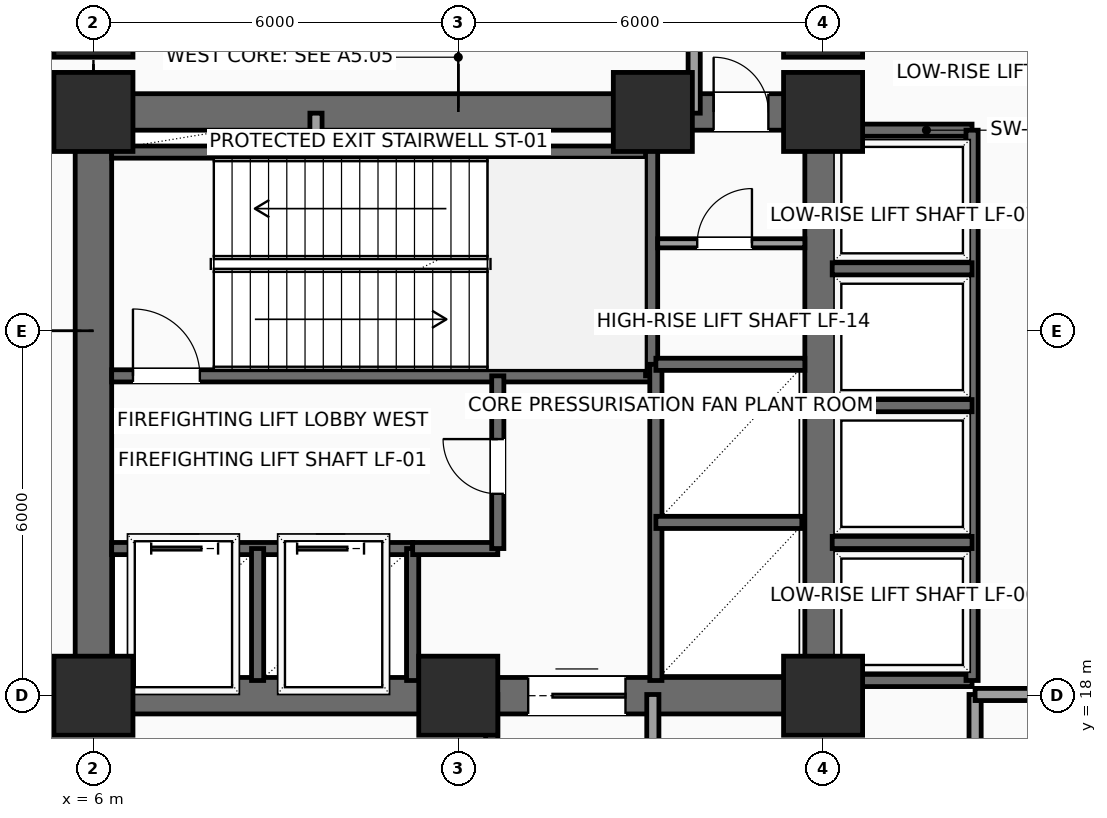
"""IFC4 building model, lengths in metres.
Left out: names, types, materials, properties, quantities, classifications, styles, units other than length and angle.
Written with IfcOpenShell. Run it as: python <this file> out.ifc"""

import sys

from ifc_helpers import new_model, si_unit, direction, frame, frame_2d, origin, origin_2d, place, context, subcontext, project, spatial, rectangle, extrude, element, fill, save


model = new_model("IFC4")
c1 = context("Model", 3, precision=1e-05, world=origin(), true_north=direction((0.0, 1.0)))
c2 = subcontext(c1, "Body", "Model", "MODEL_VIEW")
j1 = project(units=[si_unit("LENGTHUNIT", "METRE"), si_unit("PLANEANGLEUNIT", "RADIAN")], contexts=[c1])
p1 = place(None, origin())
s1 = spatial("IfcSite", under=j1, at=p1, CompositionType="ELEMENT")
p2 = place(p1, origin())
s2 = spatial("IfcBuilding", under=s1, at=p2, CompositionType="ELEMENT")
p3 = place(p2, frame((0.0, 0.0, 94.8)))
s3 = spatial("IfcBuildingStorey", under=s2, at=p3, CompositionType="ELEMENT", Elevation=94.8)
for number, where, z_axis, x_axis in (
    (1, (6.0, 18.0, 0.0), (0.0, 0.0, 1.0), (1.0, 0.0, 0.0)),
    (2, (12.0, 18.0, 0.0), (0.0, 0.0, 1.0), (1.0, 0.0, 0.0)),
    (3, (18.0, 18.0, 0.0), (0.0, 0.0, 1.0), (1.0, 0.0, 0.0)),
    (4, (6.0, 27.6, 0.0), (0.0, 0.0, 1.0), (1.0, 0.0, 0.0)),
    (5, (15.2, 27.6, 0.0), (0.0, 0.0, 1.0), (1.0, 0.0, 0.0)),
    (6, (18.0, 27.6, 0.0), (0.0, 0.0, 1.0), (1.0, 0.0, 0.0)),
    (7, (6.0, 29.15, 0.0), (0.0, 0.0, 1.0), (1.0, 0.0, 0.0)),
    (8, (18.0, 29.15, 0.0), (0.0, 0.0, 1.0), (1.0, 0.0, 0.0)),
):
    element("IfcColumn", number, at=place(p3, frame(where, z_axis=z_axis, x_axis=x_axis)), inside=s3, PredefinedType="COLUMN", context=c2, shape_type="SweptSolid", body=[
        extrude(rectangle(XDim=1.3, YDim=1.3, at=origin_2d()), origin(), (0.0, 0.0, 1.0), 4.8),
    ])
p4 = place(p3, frame((6.0, 18.0, 0.0), z_axis=(0.0, 0.0, 1.0), x_axis=(1.0, 0.0, 0.0)))
e9 = element("IfcWall", 9, at=p4, inside=s3, PredefinedType="SHEAR", context=c2, shape_type="SweptSolid", body=[
    extrude(rectangle(XDim=12.0, YDim=0.6, at=frame_2d((6.0, 0.0))), origin(), (0.0, 0.0, 1.0), 4.575),
])
p5 = place(p4, frame((7.15, 0.0, 0.0)))
e10 = element("IfcOpeningElement", 10, at=p5, cuts=e9, PredefinedType="OPENING", context=c2, shape_type="SweptSolid", body=[
    extrude(rectangle(XDim=1.6, YDim=2.3, at=frame_2d((0.8, 1.15))), frame((0.0, 0.31, 0.0), z_axis=(0.0, -1.0, 0.0), x_axis=(1.0, 0.0, 0.0)), (0.0, 0.0, 1.0), 0.62),
])
p6 = place(p3, frame((6.0, 27.6, 0.0), z_axis=(0.0, 0.0, 1.0), x_axis=(1.0, 0.0, 0.0)))
e11 = element("IfcWall", 11, at=p6, inside=s3, PredefinedType="SHEAR", context=c2, shape_type="SweptSolid", body=[
    extrude(rectangle(XDim=12.0, YDim=0.6, at=frame_2d((6.0, 0.0))), origin(), (0.0, 0.0, 1.0), 4.575),
])
p7 = place(p6, frame((10.2, 0.0, 0.0)))
e12 = element("IfcOpeningElement", 12, at=p7, cuts=e11, PredefinedType="OPENING", context=c2, shape_type="SweptSolid", body=[
    extrude(rectangle(XDim=0.9, YDim=2.15, at=frame_2d((0.45, 1.075))), frame((0.0, 0.31, 0.0), z_axis=(0.0, -1.0, 0.0), x_axis=(1.0, 0.0, 0.0)), (0.0, 0.0, 1.0), 0.62),
])
for number, where, z_axis, x_axis in (
    (13, (6.0, 18.0, 0.0), (0.0, 0.0, 1.0), (0.0, 1.0, 0.0)),
    (14, (18.0, 18.0, 0.0), (0.0, 0.0, 1.0), (0.0, 1.0, 0.0)),
):
    element("IfcWall", number, at=place(p3, frame(where, z_axis=z_axis, x_axis=x_axis)), inside=s3, PredefinedType="SHEAR", context=c2, shape_type="SweptSolid", body=[
        extrude(rectangle(XDim=9.6, YDim=0.6, at=frame_2d((4.8, 0.0))), origin(), (0.0, 0.0, 1.0), 4.575),
    ])
p8 = place(p3, frame((6.3, 23.26, 0.0), z_axis=(0.0, 0.0, 1.0), x_axis=(1.0, 0.0, 0.0)))
e15 = element("IfcWall", 15, at=p8, inside=s3, PredefinedType="SHEAR", context=c2, shape_type="SweptSolid", body=[
    extrude(rectangle(XDim=8.88, YDim=0.2, at=frame_2d((4.44, 0.0))), origin(), (0.0, 0.0, 1.0), 4.575),
])
p9 = place(p8, frame((0.35, 0.0, 0.0)))
e16 = element("IfcOpeningElement", 16, at=p9, cuts=e15, PredefinedType="OPENING", context=c2, shape_type="SweptSolid", body=[
    extrude(rectangle(XDim=1.1, YDim=2.2, at=frame_2d((0.55, 1.1))), frame((0.0, 0.11, 0.0), z_axis=(0.0, -1.0, 0.0), x_axis=(1.0, 0.0, 0.0)), (0.0, 0.0, 1.0), 0.22),
])
p10 = place(p3, frame((6.3, 26.94, 0.0), z_axis=(0.0, 0.0, 1.0), x_axis=(1.0, 0.0, 0.0)))
e17 = element("IfcWall", 17, at=p10, inside=s3, PredefinedType="SHEAR", context=c2, shape_type="SweptSolid", body=[
    extrude(rectangle(XDim=8.88, YDim=0.2, at=frame_2d((4.44, 0.0))), origin(), (0.0, 0.0, 1.0), 4.575),
])
p11 = place(p3, frame((15.18, 23.26, 0.0), z_axis=(0.0, 0.0, 1.0), x_axis=(0.0, 1.0, 0.0)))
e18 = element("IfcWall", 18, at=p11, inside=s3, PredefinedType="SHEAR", context=c2, shape_type="SweptSolid", body=[
    extrude(rectangle(XDim=4.04, YDim=0.2, at=frame_2d((2.02, 0.0))), origin(), (0.0, 0.0, 1.0), 4.575),
])
p12 = place(p3, frame((6.3, 20.42, 0.0), z_axis=(0.0, 0.0, 1.0), x_axis=(1.0, 0.0, 0.0)))
e19 = element("IfcWall", 19, at=p12, inside=s3, PredefinedType="SHEAR", context=c2, shape_type="SweptSolid", body=[
    extrude(rectangle(XDim=4.95, YDim=0.2, at=frame_2d((2.475, 0.0))), origin(), (0.0, 0.0, 1.0), 4.575),
])
p13 = place(p12, frame((0.65, 0.0, 0.0)))
e20 = element("IfcOpeningElement", 20, at=p13, cuts=e19, PredefinedType="OPENING", context=c2, shape_type="SweptSolid", body=[
    extrude(rectangle(XDim=1.1, YDim=2.2, at=frame_2d((0.55, 1.1))), frame((0.0, 0.11, 0.0), z_axis=(0.0, -1.0, 0.0), x_axis=(1.0, 0.0, 0.0)), (0.0, 0.0, 1.0), 0.22),
])
p14 = place(p12, frame((3.05, 0.0, 0.0)))
e21 = element("IfcOpeningElement", 21, at=p14, cuts=e19, PredefinedType="OPENING", context=c2, shape_type="SweptSolid", body=[
    extrude(rectangle(XDim=1.1, YDim=2.2, at=frame_2d((0.55, 1.1))), frame((0.0, 0.11, 0.0), z_axis=(0.0, -1.0, 0.0), x_axis=(1.0, 0.0, 0.0)), (0.0, 0.0, 1.0), 0.22),
])
for number, where, z_axis, x_axis in (
    (22, (8.7, 18.25, 0.0), (0.0, 0.0, 1.0), (0.0, 1.0, 0.0)),
    (23, (11.25, 18.25, 0.0), (0.0, 0.0, 1.0), (0.0, 1.0, 0.0)),
):
    element("IfcWall", number, at=place(p3, frame(where, z_axis=z_axis, x_axis=x_axis)), inside=s3, PredefinedType="SHEAR", context=c2, shape_type="SweptSolid", body=[
        extrude(rectangle(XDim=2.17, YDim=0.2, at=frame_2d((1.085, 0.0))), origin(), (0.0, 0.0, 1.0), 4.575),
    ])
p15 = place(p3, frame((11.25, 20.42, 0.0), z_axis=(0.0, 0.0, 1.0), x_axis=(1.0, 0.0, 0.0)))
e24 = element("IfcWall", 24, at=p15, inside=s3, PredefinedType="SHEAR", context=c2, shape_type="SweptSolid", body=[
    extrude(rectangle(XDim=1.4, YDim=0.2, at=frame_2d((0.7, 0.0))), origin(), (0.0, 0.0, 1.0), 4.575),
])
p16 = place(p3, frame((12.65, 20.42, 0.0), z_axis=(0.0, 0.0, 1.0), x_axis=(0.0, 1.0, 0.0)))
e25 = element("IfcWall", 25, at=p16, inside=s3, PredefinedType="SHEAR", context=c2, shape_type="SweptSolid", body=[
    extrude(rectangle(XDim=2.84, YDim=0.2, at=frame_2d((1.42, 0.0))), origin(), (0.0, 0.0, 1.0), 4.575),
])
p17 = place(p16, frame((0.9, 0.0, 0.0)))
e26 = element("IfcOpeningElement", 26, at=p17, cuts=e25, PredefinedType="OPENING", context=c2, shape_type="SweptSolid", body=[
    extrude(rectangle(XDim=0.9, YDim=2.15, at=frame_2d((0.45, 1.075))), frame((0.0, 0.11, 0.0), z_axis=(0.0, -1.0, 0.0), x_axis=(1.0, 0.0, 0.0)), (0.0, 0.0, 1.0), 0.22),
])
p18 = place(p3, frame((9.66, 26.94, 0.0), z_axis=(0.0, 0.0, 1.0), x_axis=(0.0, 1.0, 0.0)))
e27 = element("IfcWall", 27, at=p18, inside=s3, PredefinedType="SOLIDWALL", context=c2, shape_type="SweptSolid", body=[
    extrude(rectangle(XDim=0.64, YDim=0.2, at=frame_2d((0.32, 0.0))), origin(), (0.0, 0.0, 1.0), 4.575),
])
p19 = place(p3, frame((15.25, 18.25, 0.0), z_axis=(0.0, 0.0, 1.0), x_axis=(0.0, 1.0, 0.0)))
e28 = element("IfcWall", 28, at=p19, inside=s3, PredefinedType="SHEAR", context=c2, shape_type="SweptSolid", body=[
    extrude(rectangle(XDim=5.2, YDim=0.2, at=frame_2d((2.6, 0.0))), origin(), (0.0, 0.0, 1.0), 4.575),
])
p20 = place(p3, frame((15.25, 20.85, 0.0), z_axis=(0.0, 0.0, 1.0), x_axis=(1.0, 0.0, 0.0)))
e29 = element("IfcWall", 29, at=p20, inside=s3, PredefinedType="SHEAR", context=c2, shape_type="SweptSolid", body=[
    extrude(rectangle(XDim=2.4, YDim=0.2, at=frame_2d((1.2, 0.0))), origin(), (0.0, 0.0, 1.0), 4.575),
])
p21 = place(p3, frame((15.25, 23.45, 0.0), z_axis=(0.0, 0.0, 1.0), x_axis=(1.0, 0.0, 0.0)))
e30 = element("IfcWall", 30, at=p21, inside=s3, PredefinedType="SHEAR", context=c2, shape_type="SweptSolid", body=[
    extrude(rectangle(XDim=2.45, YDim=0.2, at=frame_2d((1.225, 0.0))), origin(), (0.0, 0.0, 1.0), 4.575),
])
p22 = place(p3, frame((15.28, 25.44, 0.0), z_axis=(0.0, 0.0, 1.0), x_axis=(1.0, 0.0, 0.0)))
e31 = element("IfcWall", 31, at=p22, inside=s3, PredefinedType="PARTITIONING", context=c2, shape_type="SweptSolid", body=[
    extrude(rectangle(XDim=2.42, YDim=0.15, at=frame_2d((1.21, 0.0))), origin(), (0.0, 0.0, 1.0), 4.575),
])
p23 = place(p22, frame((0.65, 0.0, 0.0)))
e32 = element("IfcOpeningElement", 32, at=p23, cuts=e31, PredefinedType="OPENING", context=c2, shape_type="SweptSolid", body=[
    extrude(rectangle(XDim=0.9, YDim=2.15, at=frame_2d((0.45, 1.075))), frame((0.0, 0.085, 0.0), z_axis=(0.0, -1.0, 0.0), x_axis=(1.0, 0.0, 0.0)), (0.0, 0.0, 1.0), 0.17),
])
for number, where, z_axis, x_axis in (
    (33, (18.1, 27.3, 0.0), (0.0, 0.0, 1.0), (1.0, 0.0, 0.0)),
    (34, (18.1, 18.25, 0.0), (0.0, 0.0, 1.0), (1.0, 0.0, 0.0)),
):
    element("IfcWall", number, at=place(p3, frame(where, z_axis=z_axis, x_axis=x_axis)), inside=s3, PredefinedType="SHEAR", context=c2, shape_type="SweptSolid", body=[
        extrude(rectangle(XDim=2.35, YDim=0.2, at=frame_2d((1.175, 0.0))), origin(), (0.0, 0.0, 1.0), 4.575),
    ])
p24 = place(p3, frame((20.45, 18.25, 0.0), z_axis=(0.0, 0.0, 1.0), x_axis=(0.0, 1.0, 0.0)))
e35 = element("IfcWall", 35, at=p24, inside=s3, PredefinedType="SHEAR", context=c2, shape_type="SweptSolid", body=[
    extrude(rectangle(XDim=9.05, YDim=0.2, at=frame_2d((4.525, 0.0))), origin(), (0.0, 0.0, 1.0), 4.575),
])
for number, where, z_axis, x_axis in (
    (36, (18.15, 20.52, 0.0), (0.0, 0.0, 1.0), (1.0, 0.0, 0.0)),
    (37, (18.15, 22.77, 0.0), (0.0, 0.0, 1.0), (1.0, 0.0, 0.0)),
    (38, (18.15, 25.02, 0.0), (0.0, 0.0, 1.0), (1.0, 0.0, 0.0)),
):
    element("IfcWall", number, at=place(p3, frame(where, z_axis=z_axis, x_axis=x_axis)), inside=s3, PredefinedType="SHEAR", context=c2, shape_type="SweptSolid", body=[
        extrude(rectangle(XDim=2.3, YDim=0.2, at=frame_2d((1.15, 0.0))), origin(), (0.0, 0.0, 1.0), 4.575),
    ])
for number, where, z_axis, x_axis in (
    (39, (12.55, 16.45, 0.0), (0.0, 0.0, 1.0), (0.0, 1.0, 0.0)),
    (40, (15.2, 18.02, 0.0), (0.0, 0.0, 1.0), (0.0, -1.0, 0.0)),
    (41, (20.5, 16.45, 0.0), (0.0, 0.0, 1.0), (0.0, 1.0, 0.0)),
):
    element("IfcWall", number, at=place(p3, frame(where, z_axis=z_axis, x_axis=x_axis)), inside=s3, PredefinedType="SOLIDWALL", context=c2, shape_type="SweptSolid", body=[
        extrude(rectangle(XDim=1.57, YDim=0.2, at=frame_2d((0.785, 0.0))), origin(), (0.0, 0.0, 1.0), 4.575),
    ])
p25 = place(p3, frame((20.5, 18.02, 0.0), z_axis=(0.0, 0.0, 1.0), x_axis=(1.0, 0.0, 0.0)))
e42 = element("IfcWall", 42, at=p25, inside=s3, PredefinedType="SOLIDWALL", context=c2, shape_type="SweptSolid", body=[
    extrude(rectangle(XDim=1.52, YDim=0.2, at=frame_2d((0.76, 0.0))), origin(), (0.0, 0.0, 1.0), 4.067),
])
p26 = place(p3, frame((15.88, 27.58, 0.0), z_axis=(0.0, 0.0, 1.0), x_axis=(0.0, 1.0, 0.0)))
e43 = element("IfcWall", 43, at=p26, inside=s3, PredefinedType="SOLIDWALL", context=c2, shape_type="SweptSolid", body=[
    extrude(rectangle(XDim=2.52, YDim=0.2, at=frame_2d((1.26, 0.0))), origin(), (0.0, 0.0, 1.0), 4.575),
])
p27 = place(p5, origin())
e44 = element("IfcDoor", 44, at=p27, inside=s3, OperationType="DOUBLE_DOOR_SLIDING", PredefinedType="DOOR", context=c2, shape_type="SweptSolid", body=[
    extrude(rectangle(XDim=1.6, YDim=2.3, at=frame_2d((0.8, 1.15))), frame((0.0, 0.025, 0.0), z_axis=(0.0, -1.0, 0.0), x_axis=(1.0, 0.0, 0.0)), (0.0, 0.0, 1.0), 0.05),
])
fill(e10, e44)
p28 = place(p7, origin())
e45 = element("IfcDoor", 45, at=p28, inside=s3, OperationType="SINGLE_SWING_LEFT", PredefinedType="DOOR", context=c2, shape_type="SweptSolid", body=[
    extrude(rectangle(XDim=0.9, YDim=2.15, at=frame_2d((0.45, 1.075))), frame((0.0, 0.025, 0.0), z_axis=(0.0, -1.0, 0.0), x_axis=(1.0, 0.0, 0.0)), (0.0, 0.0, 1.0), 0.05),
])
fill(e12, e45)
p29 = place(p9, origin())
e46 = element("IfcDoor", 46, at=p29, inside=s3, OperationType="SINGLE_SWING_LEFT", PredefinedType="DOOR", context=c2, shape_type="SweptSolid", body=[
    extrude(rectangle(XDim=1.1, YDim=2.2, at=frame_2d((0.55, 1.1))), frame((0.0, 0.025, 0.0), z_axis=(0.0, -1.0, 0.0), x_axis=(1.0, 0.0, 0.0)), (0.0, 0.0, 1.0), 0.05),
])
fill(e16, e46)
p30 = place(p13, origin())
e47 = element("IfcDoor", 47, at=p30, inside=s3, OperationType="SLIDING_TO_LEFT", PredefinedType="DOOR", context=c2, shape_type="SweptSolid", body=[
    extrude(rectangle(XDim=1.1, YDim=2.2, at=frame_2d((0.55, 1.1))), frame((0.0, 0.025, 0.0), z_axis=(0.0, -1.0, 0.0), x_axis=(1.0, 0.0, 0.0)), (0.0, 0.0, 1.0), 0.05),
])
fill(e20, e47)
p31 = place(p14, origin())
e48 = element("IfcDoor", 48, at=p31, inside=s3, OperationType="SLIDING_TO_LEFT", PredefinedType="DOOR", context=c2, shape_type="SweptSolid", body=[
    extrude(rectangle(XDim=1.1, YDim=2.2, at=frame_2d((0.55, 1.1))), frame((0.0, 0.025, 0.0), z_axis=(0.0, -1.0, 0.0), x_axis=(1.0, 0.0, 0.0)), (0.0, 0.0, 1.0), 0.05),
])
fill(e21, e48)
p32 = place(p17, origin())
e49 = element("IfcDoor", 49, at=p32, inside=s3, OperationType="SINGLE_SWING_RIGHT", PredefinedType="DOOR", context=c2, shape_type="SweptSolid", body=[
    extrude(rectangle(XDim=0.9, YDim=2.15, at=frame_2d((0.45, 1.075))), frame((0.0, 0.025, 0.0), z_axis=(0.0, -1.0, 0.0), x_axis=(1.0, 0.0, 0.0)), (0.0, 0.0, 1.0), 0.05),
])
fill(e26, e49)
p33 = place(p23, origin())
e50 = element("IfcDoor", 50, at=p33, inside=s3, OperationType="SINGLE_SWING_RIGHT", PredefinedType="DOOR", context=c2, shape_type="SweptSolid", body=[
    extrude(rectangle(XDim=0.9, YDim=2.15, at=frame_2d((0.45, 1.075))), frame((0.0, 0.025, 0.0), z_axis=(0.0, -1.0, 0.0), x_axis=(1.0, 0.0, 0.0)), (0.0, 0.0, 1.0), 0.05),
])
fill(e32, e50)
save(model, sys.argv[1])
